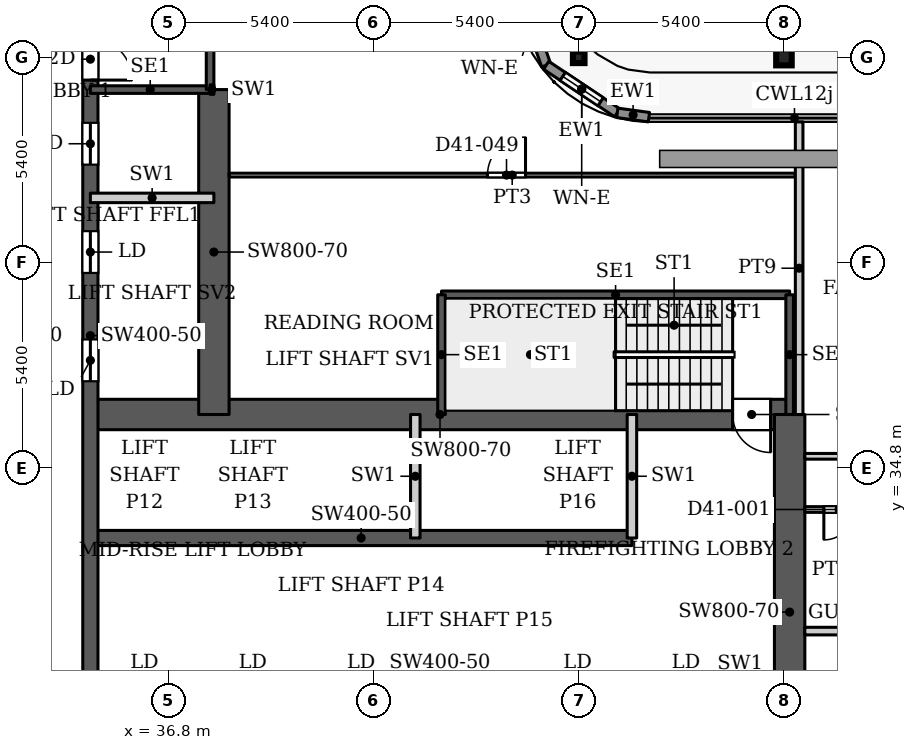
"""IFC4 building model, lengths in metres.
Left out: names, types, materials, properties, quantities, classifications, styles, units other than length and angle.
Written with IfcOpenShell. Run it as: python <this file> out.ifc"""

import sys

from ifc_helpers import new_model, si_unit, direction, frame, frame_2d, origin, origin_2d, place, context, subcontext, project, spatial, rectangle, hollow_rectangle, i_section, extrude, source, transform, mapped, element, fill, save


model = new_model("IFC4")
c1 = context("Model", 3, precision=1e-05, world=origin(), true_north=direction((0.0, 1.0)))
c2 = subcontext(c1, "Body", "Model", "MODEL_VIEW")
j1 = project(units=[si_unit("LENGTHUNIT", "METRE"), si_unit("PLANEANGLEUNIT", "RADIAN")], contexts=[c1])
p1 = place(None, origin())
s1 = spatial("IfcSite", under=j1, at=p1, CompositionType="ELEMENT")
p2 = place(p1, origin())
s2 = spatial("IfcBuilding", under=s1, at=p2, CompositionType="ELEMENT")
p3 = place(p2, frame((0.0, 0.0, 176.0)))
s3 = spatial("IfcBuildingStorey", under=s2, at=p3, CompositionType="ELEMENT", Elevation=176.0)
p4 = place(p3, frame((53.0, 45.6, 0.0), z_axis=(0.0, 0.0, 1.0), x_axis=(1.0, 0.0, 0.0)))
e1 = element("IfcColumn", 1, at=p4, inside=s3, PredefinedType="COLUMN", context=c2, shape_type="SweptSolid", body=[
    extrude(i_section(OverallWidth=0.409, OverallDepth=0.425, WebThickness=0.033, FlangeThickness=0.052, FilletRadius=0.013, at=origin_2d()), origin(), (0.0, 0.0, 1.0), 3.9),
])
p5 = place(p3, frame((47.6, 45.6, 0.0), z_axis=(0.0, 0.0, 1.0), x_axis=(1.0, 0.0, 0.0)))
e2 = element("IfcColumn", 2, at=p5, inside=s3, PredefinedType="COLUMN", context=c2, shape_type="SweptSolid", body=[
    extrude(hollow_rectangle(XDim=0.305, YDim=0.305, WallThickness=0.016, InnerFilletRadius=0.016, OuterFilletRadius=0.032, at=origin_2d()), origin(), (0.0, 0.0, 1.0), 3.9),
])
p6 = place(p3, frame((34.75, 32.95, 0.0), z_axis=(0.0, 0.0, 1.0), x_axis=(1.0, 0.0, 0.0)))
e3 = element("IfcWall", 3, at=p6, inside=s3, PredefinedType="SHEAR", context=c2, shape_type="SweptSolid", body=[
    extrude(rectangle(XDim=14.25, YDim=0.4, at=frame_2d((7.125, 0.0))), origin(), (0.0, 0.0, 1.0), 3.9),
])
p7 = place(p3, frame((34.75, 36.2, 0.0), z_axis=(0.0, 0.0, 1.0), x_axis=(1.0, 0.0, 0.0)))
e4 = element("IfcWall", 4, at=p7, inside=s3, PredefinedType="SHEAR", context=c2, shape_type="SweptSolid", body=[
    extrude(rectangle(XDim=18.4, YDim=0.8, at=frame_2d((9.2, 0.0))), origin(), (0.0, 0.0, 1.0), 3.9),
])
p8 = place(p7, frame((16.9, 0.0, 0.0)))
e5 = element("IfcOpeningElement", 5, at=p8, cuts=e4, PredefinedType="OPENING", context=c2, shape_type="SweptSolid", body=[
    extrude(rectangle(XDim=1.0, YDim=2.2, at=frame_2d((0.5, 1.1))), frame((0.0, 0.41, 0.0), z_axis=(0.0, -1.0, 0.0), x_axis=(1.0, 0.0, 0.0)), (0.0, 0.0, 1.0), 0.82),
])
p9 = place(p3, frame((34.75, 29.05, 0.0), z_axis=(0.0, 0.0, 1.0), x_axis=(0.0, 1.0, 0.0)))
e6 = element("IfcWall", 6, at=p9, inside=s3, PredefinedType="SHEAR", context=c2, shape_type="SweptSolid", body=[
    extrude(rectangle(XDim=18.45, YDim=0.4, at=frame_2d((9.225, 0.0))), origin(), (0.0, 0.0, 1.0), 3.9),
])
p10 = place(p9, frame((8.025, 0.0, 0.0)))
e7 = element("IfcOpeningElement", 7, at=p10, cuts=e6, PredefinedType="OPENING", context=c2, shape_type="SweptSolid", body=[
    extrude(rectangle(XDim=1.1, YDim=2.2, at=frame_2d((0.55, 1.1))), frame((0.0, 0.21, 0.0), z_axis=(0.0, -1.0, 0.0), x_axis=(1.0, 0.0, 0.0)), (0.0, 0.0, 1.0), 0.42),
])
p11 = place(p9, frame((10.875, 0.0, 0.0)))
e8 = element("IfcOpeningElement", 8, at=p11, cuts=e6, PredefinedType="OPENING", context=c2, shape_type="SweptSolid", body=[
    extrude(rectangle(XDim=1.1, YDim=2.2, at=frame_2d((0.55, 1.1))), frame((0.0, 0.21, 0.0), z_axis=(0.0, -1.0, 0.0), x_axis=(1.0, 0.0, 0.0)), (0.0, 0.0, 1.0), 0.42),
])
p12 = place(p9, frame((13.725, 0.0, 0.0)))
e9 = element("IfcOpeningElement", 9, at=p12, cuts=e6, PredefinedType="OPENING", context=c2, shape_type="SweptSolid", body=[
    extrude(rectangle(XDim=1.1, YDim=2.2, at=frame_2d((0.55, 1.1))), frame((0.0, 0.21, 0.0), z_axis=(0.0, -1.0, 0.0), x_axis=(1.0, 0.0, 0.0)), (0.0, 0.0, 1.0), 0.42),
])
p13 = place(p9, frame((15.95, 0.0, 0.0)))
e10 = element("IfcOpeningElement", 10, at=p13, cuts=e6, PredefinedType="OPENING", context=c2, shape_type="SweptSolid", body=[
    extrude(rectangle(XDim=1.1, YDim=2.2, at=frame_2d((0.55, 1.1))), frame((0.0, 0.21, 0.0), z_axis=(0.0, -1.0, 0.0), x_axis=(1.0, 0.0, 0.0)), (0.0, 0.0, 1.0), 0.42),
])
p14 = place(p3, frame((38.0, 36.2, 0.0), z_axis=(0.0, 0.0, 1.0), x_axis=(0.0, 1.0, 0.0)))
e11 = element("IfcWall", 11, at=p14, inside=s3, PredefinedType="SHEAR", context=c2, shape_type="SweptSolid", body=[
    extrude(rectangle(XDim=8.55, YDim=0.8, at=frame_2d((4.275, 0.0))), origin(), (0.0, 0.0, 1.0), 3.9),
])
p15 = place(p3, frame((53.15, 25.8, 0.0), z_axis=(0.0, 0.0, 1.0), x_axis=(0.0, 1.0, 0.0)))
e12 = element("IfcWall", 12, at=p15, inside=s3, PredefinedType="SHEAR", context=c2, shape_type="SweptSolid", body=[
    extrude(rectangle(XDim=10.4, YDim=0.8, at=frame_2d((5.2, 0.0))), origin(), (0.0, 0.0, 1.0), 3.9),
])
p16 = place(p3, frame((46.018, 47.471, 0.0), z_axis=(0.0, 0.0, 1.0), x_axis=(0.328791208903, -0.944402637093, 0.0)))
e13 = element("IfcWall", 13, at=p16, inside=s3, PredefinedType="SOLIDWALL", context=c2, shape_type="SweptSolid", body=[
    extrude(rectangle(XDim=2.205, YDim=0.25, at=frame_2d((1.102, 0.0))), origin(), (0.0, 0.0, 1.0), 3.75),
])
p17 = place(p16, frame((0.503, 0.0, 0.6)))
e14 = element("IfcOpeningElement", 14, at=p17, cuts=e13, PredefinedType="OPENING", context=c2, shape_type="SweptSolid", body=[
    extrude(rectangle(XDim=1.2, YDim=2.1, at=frame_2d((0.6, 1.05))), frame((0.0, 0.135, 0.0), z_axis=(0.0, -1.0, 0.0), x_axis=(1.0, 0.0, 0.0)), (0.0, 0.0, 1.0), 0.27),
])
p18 = place(p3, frame((46.743, 45.389, 0.0), z_axis=(0.0, 0.0, 1.0), x_axis=(0.831449265529, -0.555600682912, 0.0)))
e15 = element("IfcWall", 15, at=p18, inside=s3, PredefinedType="SOLIDWALL", context=c2, shape_type="SweptSolid", body=[
    extrude(rectangle(XDim=2.251, YDim=0.25, at=frame_2d((1.126, 0.0))), origin(), (0.0, 0.0, 1.0), 3.75),
])
p19 = place(p18, frame((0.525, 0.0, 0.6)))
e16 = element("IfcOpeningElement", 16, at=p19, cuts=e15, PredefinedType="OPENING", context=c2, shape_type="SweptSolid", body=[
    extrude(rectangle(XDim=1.2, YDim=2.1, at=frame_2d((0.6, 1.05))), frame((0.0, 0.135, 0.0), z_axis=(0.0, -1.0, 0.0), x_axis=(1.0, 0.0, 0.0)), (0.0, 0.0, 1.0), 0.27),
])
p20 = place(p3, frame((48.615, 44.138, 0.0), z_axis=(0.0, 0.0, 1.0), x_axis=(0.990741504246, -0.135761819977, 0.0)))
e17 = element("IfcWall", 17, at=p20, inside=s3, PredefinedType="SOLIDWALL", context=c2, shape_type="SweptSolid", body=[
    extrude(rectangle(XDim=0.84, YDim=0.25, at=frame_2d((0.42, 0.0))), origin(), (0.0, 0.0, 1.0), 3.75),
])
p21 = place(p3, frame((43.99, 39.35, 0.0), z_axis=(0.0, 0.0, 1.0), x_axis=(1.0, 0.0, 0.0)))
e18 = element("IfcWall", 18, at=p21, inside=s3, PredefinedType="SHEAR", context=c2, shape_type="SweptSolid", body=[
    extrude(rectangle(XDim=9.16, YDim=0.2, at=frame_2d((4.58, 0.0))), origin(), (0.0, 0.0, 1.0), 3.9),
])
for number, where, z_axis, x_axis in (
    (19, (43.99, 36.2, 0.0), (0.0, 0.0, 1.0), (0.0, 1.0, 0.0)),
    (20, (53.15, 36.2, 0.0), (0.0, 0.0, 1.0), (0.0, 1.0, 0.0)),
):
    element("IfcWall", number, at=place(p3, frame(where, z_axis=z_axis, x_axis=x_axis)), inside=s3, PredefinedType="SHEAR", context=c2, shape_type="SweptSolid", body=[
        extrude(rectangle(XDim=3.15, YDim=0.2, at=frame_2d((1.575, 0.0))), origin(), (0.0, 0.0, 1.0), 3.9),
    ])
p22 = place(p3, frame((34.75, 44.75, 0.0), z_axis=(0.0, 0.0, 1.0), x_axis=(1.0, 0.0, 0.0)))
e21 = element("IfcWall", 21, at=p22, inside=s3, PredefinedType="SHEAR", context=c2, shape_type="SweptSolid", body=[
    extrude(rectangle(XDim=3.15, YDim=0.2, at=frame_2d((1.575, 0.0))), origin(), (0.0, 0.0, 1.0), 3.9),
])
p23 = place(p3, frame((37.9, 44.75, 0.0), z_axis=(0.0, 0.0, 1.0), x_axis=(0.0, 1.0, 0.0)))
e22 = element("IfcWall", 22, at=p23, inside=s3, PredefinedType="SHEAR", context=c2, shape_type="SweptSolid", body=[
    extrude(rectangle(XDim=9.16, YDim=0.2, at=frame_2d((4.58, 0.0))), origin(), (0.0, 0.0, 1.0), 3.9),
])
for number, where, z_axis, x_axis in (
    (23, (43.3, 32.95, 0.0), (0.0, 0.0, 1.0), (0.0, 1.0, 0.0)),
    (24, (49.0, 32.95, 0.0), (0.0, 0.0, 1.0), (0.0, 1.0, 0.0)),
    (25, (34.75, 41.9, 0.0), (0.0, 0.0, 1.0), (1.0, 0.0, 0.0)),
):
    element("IfcWall", number, at=place(p3, frame(where, z_axis=z_axis, x_axis=x_axis)), inside=s3, PredefinedType="PARTITIONING", context=c2, shape_type="SweptSolid", body=[
        extrude(rectangle(XDim=3.25, YDim=0.25, at=frame_2d((1.625, 0.0))), origin(), (0.0, 0.0, 1.0), 3.9),
    ])
p24 = place(p3, frame((37.9, 44.75, 0.0), z_axis=(0.0, 0.0, 1.0), x_axis=(1.0, 0.0, 0.0)))
e26 = element("IfcWall", 26, at=p24, inside=s3, PredefinedType="PARTITIONING", context=c2, shape_type="SweptSolid", body=[
    extrude(rectangle(XDim=0.1, YDim=0.25, at=frame_2d((0.05, 0.0))), origin(), (0.0, 0.0, 1.0), 3.9),
])
p25 = place(p3, frame((38.399, 42.5, 0.0), z_axis=(0.0, 0.0, 1.0), x_axis=(1.0, 0.0, 0.0)))
e27 = element("IfcWall", 27, at=p25, inside=s3, PredefinedType="PARTITIONING", context=c2, shape_type="SweptSolid", body=[
    extrude(rectangle(XDim=14.901, YDim=0.1, at=frame_2d((7.451, 0.0))), origin(), (0.0, 0.0, 1.0), 3.6),
])
p26 = place(p25, frame((6.801, 0.0, 0.0)))
e28 = element("IfcOpeningElement", 28, at=p26, cuts=e27, PredefinedType="OPENING", context=c2, shape_type="SweptSolid", body=[
    extrude(rectangle(XDim=1.0, YDim=2.1, at=frame_2d((0.5, 1.05))), frame((0.0, 0.06, 0.0), z_axis=(0.0, -1.0, 0.0), x_axis=(1.0, 0.0, 0.0)), (0.0, 0.0, 1.0), 0.12),
])
p27 = place(p3, frame((53.4, 36.199, 0.0), z_axis=(0.0, 0.0, 1.0), x_axis=(0.0, 1.0, 0.0)))
e29 = element("IfcWall", 29, at=p27, inside=s3, PredefinedType="PARTITIONING", context=c2, shape_type="SweptSolid", body=[
    extrude(rectangle(XDim=7.701, YDim=0.2, at=frame_2d((3.851, 0.0))), origin(), (0.0, 0.0, 1.0), 3.6),
])
p28 = place(p3, frame((53.549, 30.5, 0.0), z_axis=(0.0, 0.0, 1.0), x_axis=(1.0, 0.0, 0.0)))
e30 = element("IfcWall", 30, at=p28, inside=s3, PredefinedType="PARTITIONING", context=c2, shape_type="SweptSolid", body=[
    extrude(rectangle(XDim=44.551, YDim=0.2, at=frame_2d((22.275, 0.0))), origin(), (0.0, 0.0, 1.0), 3.6),
])
p29 = place(p28, frame((6.851, 0.0, 0.0)))
e31 = element("IfcOpeningElement", 31, at=p29, cuts=e30, PredefinedType="OPENING", context=c2, shape_type="SweptSolid", body=[
    extrude(rectangle(XDim=1.0, YDim=2.1, at=frame_2d((0.5, 1.05))), frame((0.0, 0.11, 0.0), z_axis=(0.0, -1.0, 0.0), x_axis=(1.0, 0.0, 0.0)), (0.0, 0.0, 1.0), 0.22),
])
p30 = place(p28, frame((13.451, 0.0, 0.0)))
e32 = element("IfcOpeningElement", 32, at=p30, cuts=e30, PredefinedType="OPENING", context=c2, shape_type="SweptSolid", body=[
    extrude(rectangle(XDim=1.0, YDim=2.1, at=frame_2d((0.5, 1.05))), frame((0.0, 0.11, 0.0), z_axis=(0.0, -1.0, 0.0), x_axis=(1.0, 0.0, 0.0)), (0.0, 0.0, 1.0), 0.22),
])
p31 = place(p28, frame((24.701, 0.0, 0.0)))
e33 = element("IfcOpeningElement", 33, at=p31, cuts=e30, PredefinedType="OPENING", context=c2, shape_type="SweptSolid", body=[
    extrude(rectangle(XDim=1.0, YDim=2.1, at=frame_2d((0.5, 1.05))), frame((0.0, 0.11, 0.0), z_axis=(0.0, -1.0, 0.0), x_axis=(1.0, 0.0, 0.0)), (0.0, 0.0, 1.0), 0.22),
])
p32 = place(p28, frame((38.651, 0.0, 0.0)))
e34 = element("IfcOpeningElement", 34, at=p32, cuts=e30, PredefinedType="OPENING", context=c2, shape_type="SweptSolid", body=[
    extrude(rectangle(XDim=1.0, YDim=2.1, at=frame_2d((0.5, 1.05))), frame((0.0, 0.11, 0.0), z_axis=(0.0, -1.0, 0.0), x_axis=(1.0, 0.0, 0.0)), (0.0, 0.0, 1.0), 0.22),
])
p33 = place(p3, frame((53.549, 33.7, 0.0), z_axis=(0.0, 0.0, 1.0), x_axis=(1.0, 0.0, 0.0)))
e35 = element("IfcWall", 35, at=p33, inside=s3, PredefinedType="PARTITIONING", context=c2, shape_type="SweptSolid", body=[
    extrude(rectangle(XDim=6.501, YDim=0.15, at=frame_2d((3.25, 0.0))), origin(), (0.0, 0.0, 1.0), 3.6),
])
p34 = place(p33, frame((0.501, 0.0, 0.0)))
e36 = element("IfcOpeningElement", 36, at=p34, cuts=e35, PredefinedType="OPENING", context=c2, shape_type="SweptSolid", body=[
    extrude(rectangle(XDim=0.8, YDim=2.1, at=frame_2d((0.4, 1.05))), frame((0.0, 0.085, 0.0), z_axis=(0.0, -1.0, 0.0), x_axis=(1.0, 0.0, 0.0)), (0.0, 0.0, 1.0), 0.17),
])
p35 = place(p33, frame((4.501, 0.0, 0.0)))
e37 = element("IfcOpeningElement", 37, at=p35, cuts=e35, PredefinedType="OPENING", context=c2, shape_type="SweptSolid", body=[
    extrude(rectangle(XDim=0.9, YDim=2.1, at=frame_2d((0.45, 1.05))), frame((0.0, 0.085, 0.0), z_axis=(0.0, -1.0, 0.0), x_axis=(1.0, 0.0, 0.0)), (0.0, 0.0, 1.0), 0.17),
])
p36 = place(p33, frame((2.301, 0.0, 0.0)))
e38 = element("IfcOpeningElement", 38, at=p36, cuts=e35, PredefinedType="OPENING", context=c2, shape_type="SweptSolid", body=[
    extrude(rectangle(XDim=0.8, YDim=2.1, at=frame_2d((0.4, 1.05))), frame((0.0, 0.085, 0.0), z_axis=(0.0, -1.0, 0.0), x_axis=(1.0, 0.0, 0.0)), (0.0, 0.0, 1.0), 0.17),
])
p37 = place(p3, frame((53.549, 35.1, 0.0), z_axis=(0.0, 0.0, 1.0), x_axis=(1.0, 0.0, 0.0)))
e39 = element("IfcWall", 39, at=p37, inside=s3, PredefinedType="PARTITIONING", context=c2, shape_type="SweptSolid", body=[
    extrude(rectangle(XDim=9.651, YDim=0.15, at=frame_2d((4.825, 0.0))), origin(), (0.0, 0.0, 1.0), 3.6),
])
p38 = place(p37, frame((7.651, 0.0, 0.0)))
e40 = element("IfcOpeningElement", 40, at=p38, cuts=e39, PredefinedType="OPENING", context=c2, shape_type="SweptSolid", body=[
    extrude(rectangle(XDim=0.9, YDim=2.1, at=frame_2d((0.45, 1.05))), frame((0.0, 0.085, 0.0), z_axis=(0.0, -1.0, 0.0), x_axis=(1.0, 0.0, 0.0)), (0.0, 0.0, 1.0), 0.17),
])
p39 = place(p37, frame((2.651, 0.0, 0.0)))
e41 = element("IfcOpeningElement", 41, at=p39, cuts=e39, PredefinedType="OPENING", context=c2, shape_type="SweptSolid", body=[
    extrude(rectangle(XDim=1.0, YDim=2.1, at=frame_2d((0.5, 1.05))), frame((0.0, 0.085, 0.0), z_axis=(0.0, -1.0, 0.0), x_axis=(1.0, 0.0, 0.0)), (0.0, 0.0, 1.0), 0.17),
])
m1 = source(origin(), c2, "Body", "SweptSolid", [
    extrude(rectangle(XDim=1.2, YDim=2.1, at=frame_2d((0.6, 1.05))), frame((0.0, 0.03, 0.0), z_axis=(0.0, -1.0, 0.0), x_axis=(1.0, 0.0, 0.0)), (0.0, 0.0, 1.0), 0.06),
])
p40 = place(p19, origin())
e42 = element("IfcWindow", 42, at=p40, inside=s3, PartitioningType="SINGLE_PANEL", PredefinedType="WINDOW", context=c2, shape_type="MappedRepresentation", body=[
    mapped(m1, transform((0.0, 0.0, 0.0), x_axis=(1.0, 0.0, 0.0), y_axis=(0.0, 1.0, 0.0), z_axis=(0.0, 0.0, 1.0), scale=1.0)),
])
fill(e16, e42)
m2 = source(origin(), c2, "Body", "SweptSolid", [
    extrude(rectangle(XDim=1.1, YDim=2.2, at=frame_2d((0.55, 1.1))), frame((0.0, 0.025, 0.0), z_axis=(0.0, -1.0, 0.0), x_axis=(1.0, 0.0, 0.0)), (0.0, 0.0, 1.0), 0.05),
])
p41 = place(p10, origin())
e43 = element("IfcDoor", 43, at=p41, inside=s3, OperationType="SLIDING_TO_LEFT", PredefinedType="DOOR", context=c2, shape_type="MappedRepresentation", body=[
    mapped(m2, transform((0.0, 0.0, 0.0), x_axis=(1.0, 0.0, 0.0), y_axis=(0.0, 1.0, 0.0), z_axis=(0.0, 0.0, 1.0), scale=1.0)),
])
fill(e7, e43)
p42 = place(p11, origin())
e44 = element("IfcDoor", 44, at=p42, inside=s3, OperationType="SLIDING_TO_LEFT", PredefinedType="DOOR", context=c2, shape_type="MappedRepresentation", body=[
    mapped(m2, transform((0.0, 0.0, 0.0), x_axis=(1.0, 0.0, 0.0), y_axis=(0.0, 1.0, 0.0), z_axis=(0.0, 0.0, 1.0), scale=1.0)),
])
fill(e8, e44)
p43 = place(p12, origin())
e45 = element("IfcDoor", 45, at=p43, inside=s3, OperationType="SLIDING_TO_LEFT", PredefinedType="DOOR", context=c2, shape_type="MappedRepresentation", body=[
    mapped(m2, transform((0.0, 0.0, 0.0), x_axis=(1.0, 0.0, 0.0), y_axis=(0.0, 1.0, 0.0), z_axis=(0.0, 0.0, 1.0), scale=1.0)),
])
fill(e9, e45)
m3 = source(origin(), c2, "Body", "SweptSolid", [
    extrude(rectangle(XDim=1.0, YDim=2.2, at=frame_2d((0.5, 1.1))), frame((0.0, 0.025, 0.0), z_axis=(0.0, -1.0, 0.0), x_axis=(1.0, 0.0, 0.0)), (0.0, 0.0, 1.0), 0.05),
])
p44 = place(p8, origin())
e46 = element("IfcDoor", 46, at=p44, inside=s3, OperationType="SINGLE_SWING_RIGHT", PredefinedType="DOOR", context=c2, shape_type="MappedRepresentation", body=[
    mapped(m3, transform((0.0, 0.0, 0.0), x_axis=(1.0, 0.0, 0.0), y_axis=(0.0, 1.0, 0.0), z_axis=(0.0, 0.0, 1.0), scale=1.0)),
])
fill(e5, e46)
m4 = source(origin(), c2, "Body", "SweptSolid", [
    extrude(rectangle(XDim=1.1, YDim=2.2, at=frame_2d((0.55, 1.1))), frame((0.0, 0.025, 0.0), z_axis=(0.0, -1.0, 0.0), x_axis=(1.0, 0.0, 0.0)), (0.0, 0.0, 1.0), 0.05),
])
p45 = place(p13, origin())
e47 = element("IfcDoor", 47, at=p45, inside=s3, OperationType="SINGLE_SWING_RIGHT", PredefinedType="DOOR", context=c2, shape_type="MappedRepresentation", body=[
    mapped(m4, transform((0.0, 0.0, 0.0), x_axis=(1.0, 0.0, 0.0), y_axis=(0.0, 1.0, 0.0), z_axis=(0.0, 0.0, 1.0), scale=1.0)),
])
fill(e10, e47)
m5 = source(origin(), c2, "Body", "SweptSolid", [
    extrude(rectangle(XDim=0.8, YDim=2.1, at=frame_2d((0.4, 1.05))), frame((0.0, 0.025, 0.0), z_axis=(0.0, -1.0, 0.0), x_axis=(1.0, 0.0, 0.0)), (0.0, 0.0, 1.0), 0.05),
])
p46 = place(p34, origin())
e48 = element("IfcDoor", 48, at=p46, inside=s3, OperationType="SINGLE_SWING_RIGHT", PredefinedType="DOOR", context=c2, shape_type="MappedRepresentation", body=[
    mapped(m5, transform((0.0, 0.0, 0.0), x_axis=(1.0, 0.0, 0.0), y_axis=(0.0, 1.0, 0.0), z_axis=(0.0, 0.0, 1.0), scale=1.0)),
])
fill(e36, e48)
m6 = source(origin(), c2, "Body", "SweptSolid", [
    extrude(rectangle(XDim=1.0, YDim=2.1, at=frame_2d((0.5, 1.05))), frame((0.0, 0.025, 0.0), z_axis=(0.0, -1.0, 0.0), x_axis=(1.0, 0.0, 0.0)), (0.0, 0.0, 1.0), 0.05),
])
p47 = place(p26, origin())
e49 = element("IfcDoor", 49, at=p47, inside=s3, OperationType="SINGLE_SWING_LEFT", PredefinedType="DOOR", context=c2, shape_type="MappedRepresentation", body=[
    mapped(m6, transform((0.0, 0.0, 0.0), x_axis=(1.0, 0.0, 0.0), y_axis=(0.0, 1.0, 0.0), z_axis=(0.0, 0.0, 1.0), scale=1.0)),
])
fill(e28, e49)
save(model, sys.argv[1])
